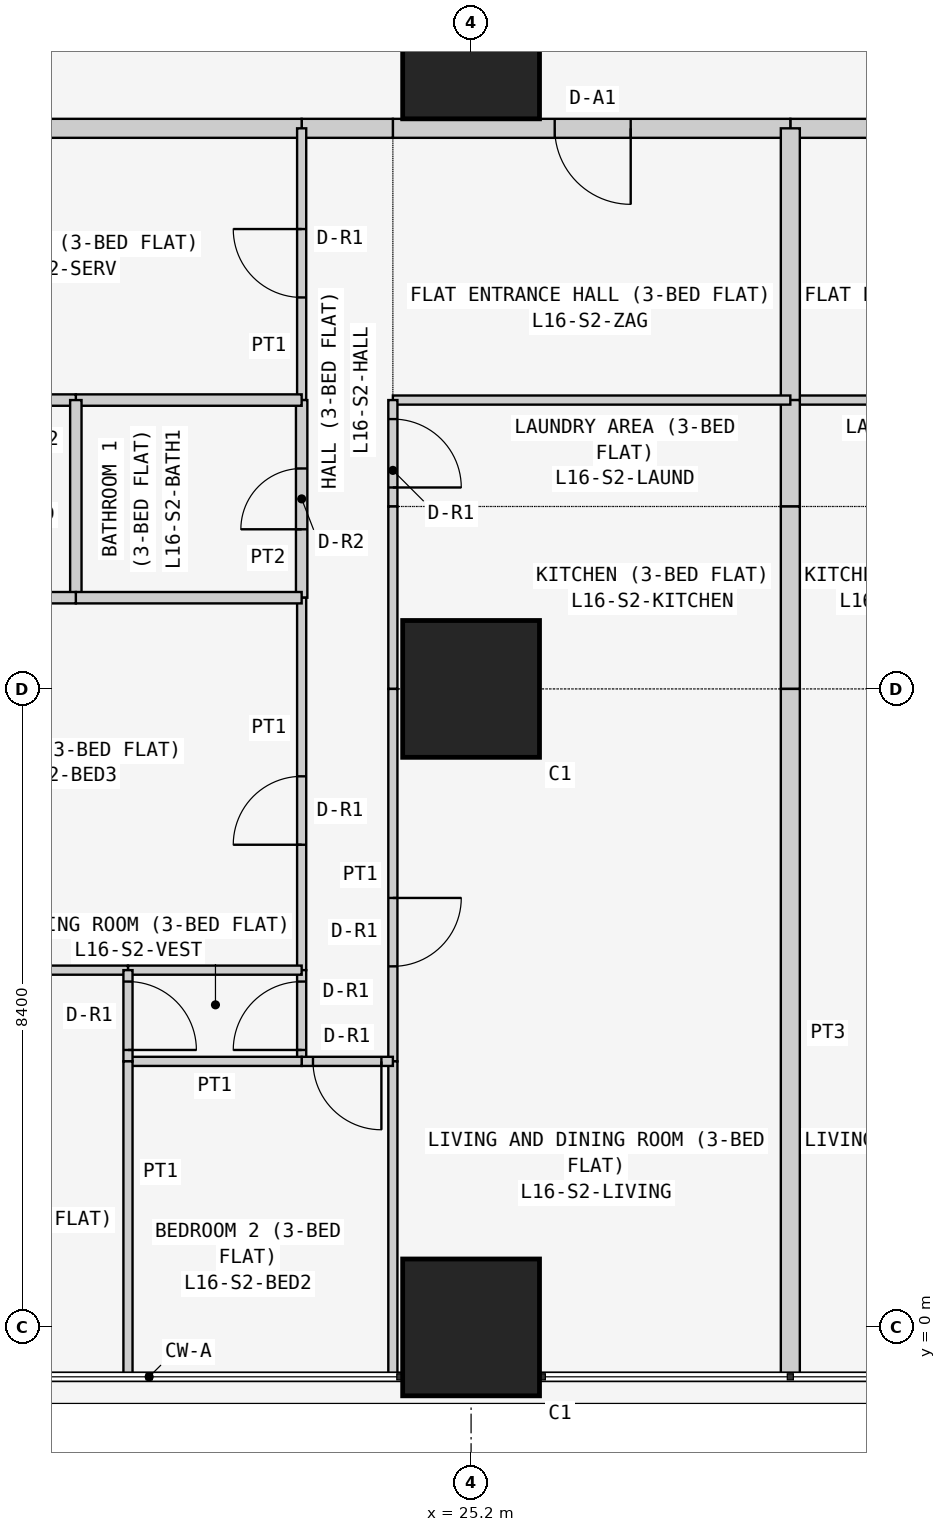
"""IFC4 building model, lengths in metres.
Left out: names, types, materials, properties, quantities, classifications, styles, units other than length and angle.
Written with IfcOpenShell. Run it as: python <this file> out.ifc"""

import sys

from ifc_helpers import new_model, si_unit, direction, frame, frame_2d, origin, origin_2d, place, context, subcontext, project, spatial, rectangle, extrude, element, fill, save


model = new_model("IFC4")
c1 = context("Model", 3, precision=1e-05, world=origin(), true_north=direction((0.0, 1.0)))
c2 = subcontext(c1, "Body", "Model", "MODEL_VIEW")
j1 = project(units=[si_unit("LENGTHUNIT", "METRE"), si_unit("PLANEANGLEUNIT", "RADIAN")], contexts=[c1])
p1 = place(None, origin())
s1 = spatial("IfcSite", under=j1, at=p1, CompositionType="ELEMENT")
p2 = place(p1, origin())
s2 = spatial("IfcBuilding", under=s1, at=p2, CompositionType="ELEMENT")
p3 = place(p2, frame((0.0, 0.0, 66.9)))
s3 = spatial("IfcBuildingStorey", under=s2, at=p3, CompositionType="ELEMENT", Elevation=66.9)
for number, where, z_axis, x_axis in (
    (1, (25.2, 0.0, 0.0), (0.0, 0.0, 1.0), (1.0, 0.0, 0.0)),
    (2, (25.2, 8.4, 0.0), (0.0, 0.0, 1.0), (1.0, 0.0, 0.0)),
    (3, (25.2, 16.8, 0.0), (0.0, 0.0, 1.0), (1.0, 0.0, 0.0)),
):
    element("IfcColumn", number, at=place(p3, frame(where, z_axis=z_axis, x_axis=x_axis)), inside=s3, PredefinedType="COLUMN", context=c2, shape_type="SweptSolid", body=[
        extrude(rectangle(XDim=1.8, YDim=1.8, at=origin_2d()), origin(), (0.0, 0.0, 1.0), 3.6),
    ])
p4 = place(p3, frame((34.629, 15.775, 0.0), z_axis=(0.0, 0.0, 1.0), x_axis=(-1.0, 0.0, 0.0)))
e4 = element("IfcWall", 4, at=p4, inside=s3, PredefinedType="PARTITIONING", context=c2, shape_type="SweptSolid", body=[
    extrude(rectangle(XDim=5.229, YDim=0.25, at=frame_2d((2.615, 0.0))), origin(), (0.0, 0.0, 1.0), 3.45),
])
p5 = place(p4, frame((2.129, 0.0, 0.0)))
e5 = element("IfcOpeningElement", 5, at=p5, cuts=e4, PredefinedType="OPENING", context=c2, shape_type="SweptSolid", body=[
    extrude(rectangle(XDim=1.0, YDim=2.1, at=frame_2d((0.5, 1.05))), frame((0.0, 0.135, 0.0), z_axis=(0.0, -1.0, 0.0), x_axis=(1.0, 0.0, 0.0)), (0.0, 0.0, 1.0), 0.27),
])
p6 = place(p3, frame((29.4, 15.775, 0.0), z_axis=(0.0, 0.0, 1.0), x_axis=(-1.0, 0.0, 0.0)))
e6 = element("IfcWall", 6, at=p6, inside=s3, PredefinedType="PARTITIONING", context=c2, shape_type="SweptSolid", body=[
    extrude(rectangle(XDim=5.229, YDim=0.25, at=frame_2d((2.615, 0.0))), origin(), (0.0, 0.0, 1.0), 3.45),
])
p7 = place(p6, frame((2.1, 0.0, 0.0)))
e7 = element("IfcOpeningElement", 7, at=p7, cuts=e6, PredefinedType="OPENING", context=c2, shape_type="SweptSolid", body=[
    extrude(rectangle(XDim=1.0, YDim=2.1, at=frame_2d((0.5, 1.05))), frame((0.0, 0.135, 0.0), z_axis=(0.0, -1.0, 0.0), x_axis=(1.0, 0.0, 0.0)), (0.0, 0.0, 1.0), 0.27),
])
p8 = place(p3, frame((24.171, 15.775, 0.0), z_axis=(0.0, 0.0, 1.0), x_axis=(-1.0, 0.0, 0.0)))
e8 = element("IfcWall", 8, at=p8, inside=s3, PredefinedType="PARTITIONING", context=c2, shape_type="SweptSolid", body=[
    extrude(rectangle(XDim=1.2, YDim=0.25, at=frame_2d((0.6, 0.0))), origin(), (0.0, 0.0, 1.0), 3.45),
])
p9 = place(p3, frame((22.971, 15.775, 0.0), z_axis=(0.0, 0.0, 1.0), x_axis=(-1.0, 0.0, 0.0)))
e9 = element("IfcWall", 9, at=p9, inside=s3, PredefinedType="PARTITIONING", context=c2, shape_type="SweptSolid", body=[
    extrude(rectangle(XDim=6.871, YDim=0.25, at=frame_2d((3.436, 0.0))), origin(), (0.0, 0.0, 1.0), 3.45),
])
p10 = place(p3, frame((29.4, 12.2, 0.0), z_axis=(0.0, 0.0, 1.0), x_axis=(1.0, 0.0, 0.0)))
e10 = element("IfcWall", 10, at=p10, inside=s3, PredefinedType="PARTITIONING", context=c2, shape_type="SweptSolid", body=[
    extrude(rectangle(XDim=5.229, YDim=0.12, at=frame_2d((2.615, 0.0))), origin(), (0.0, 0.0, 1.0), 3.45),
])
p11 = place(p3, frame((29.4, 15.775, 0.0), z_axis=(0.0, 0.0, 1.0), x_axis=(0.0, -1.0, 0.0)))
e11 = element("IfcWall", 11, at=p11, inside=s3, PredefinedType="PARTITIONING", context=c2, shape_type="SweptSolid", body=[
    extrude(rectangle(XDim=3.575, YDim=0.25, at=frame_2d((1.788, 0.0))), origin(), (0.0, 0.0, 1.0), 2.848),
])
p12 = place(p3, frame((29.4, 12.2, 0.0), z_axis=(0.0, 0.0, 1.0), x_axis=(0.0, -1.0, 0.0)))
e12 = element("IfcWall", 12, at=p12, inside=s3, PredefinedType="PARTITIONING", context=c2, shape_type="SweptSolid", body=[
    extrude(rectangle(XDim=1.4, YDim=0.25, at=frame_2d((0.7, 0.0))), origin(), (0.0, 0.0, 1.0), 2.848),
])
p13 = place(p3, frame((29.4, 10.8, 0.0), z_axis=(0.0, 0.0, 1.0), x_axis=(0.0, -1.0, 0.0)))
e13 = element("IfcWall", 13, at=p13, inside=s3, PredefinedType="PARTITIONING", context=c2, shape_type="SweptSolid", body=[
    extrude(rectangle(XDim=2.4, YDim=0.25, at=frame_2d((1.2, 0.0))), origin(), (0.0, 0.0, 1.0), 2.848),
])
p14 = place(p3, frame((29.4, 8.4, 0.0), z_axis=(0.0, 0.0, 1.0), x_axis=(0.0, -1.0, 0.0)))
e14 = element("IfcWall", 14, at=p14, inside=s3, PredefinedType="PARTITIONING", context=c2, shape_type="SweptSolid", body=[
    extrude(rectangle(XDim=9.05, YDim=0.25, at=frame_2d((4.525, 0.0))), origin(), (0.0, 0.0, 1.0), 2.848),
])
p15 = place(p3, frame((29.4, 12.2, 0.0), z_axis=(0.0, 0.0, 1.0), x_axis=(-1.0, 0.0, 0.0)))
e15 = element("IfcWall", 15, at=p15, inside=s3, PredefinedType="PARTITIONING", context=c2, shape_type="SweptSolid", body=[
    extrude(rectangle(XDim=5.229, YDim=0.12, at=frame_2d((2.615, 0.0))), origin(), (0.0, 0.0, 1.0), 3.45),
])
p16 = place(p3, frame((24.171, 10.8, 0.0), z_axis=(0.0, 0.0, 1.0), x_axis=(0.0, 1.0, 0.0)))
e16 = element("IfcWall", 16, at=p16, inside=s3, PredefinedType="PARTITIONING", context=c2, shape_type="SweptSolid", body=[
    extrude(rectangle(XDim=1.4, YDim=0.12, at=frame_2d((0.7, 0.0))), origin(), (0.0, 0.0, 1.0), 3.45),
])
p17 = place(p16, frame((0.25, 0.0, 0.0)))
e17 = element("IfcOpeningElement", 17, at=p17, cuts=e16, PredefinedType="OPENING", context=c2, shape_type="SweptSolid", body=[
    extrude(rectangle(XDim=0.9, YDim=2.1, at=frame_2d((0.45, 1.05))), frame((0.0, 0.07, 0.0), z_axis=(0.0, -1.0, 0.0), x_axis=(1.0, 0.0, 0.0)), (0.0, 0.0, 1.0), 0.14),
])
p18 = place(p3, frame((24.171, 8.4, 0.0), z_axis=(0.0, 0.0, 1.0), x_axis=(0.0, 1.0, 0.0)))
e18 = element("IfcWall", 18, at=p18, inside=s3, PredefinedType="PARTITIONING", context=c2, shape_type="SweptSolid", body=[
    extrude(rectangle(XDim=2.4, YDim=0.12, at=frame_2d((1.2, 0.0))), origin(), (0.0, 0.0, 1.0), 3.45),
])
p19 = place(p3, frame((24.171, 3.5, 0.0), z_axis=(0.0, 0.0, 1.0), x_axis=(0.0, 1.0, 0.0)))
e19 = element("IfcWall", 19, at=p19, inside=s3, PredefinedType="PARTITIONING", context=c2, shape_type="SweptSolid", body=[
    extrude(rectangle(XDim=4.9, YDim=0.12, at=frame_2d((2.45, 0.0))), origin(), (0.0, 0.0, 1.0), 3.45),
])
p20 = place(p19, frame((1.25, 0.0, 0.0)))
e20 = element("IfcOpeningElement", 20, at=p20, cuts=e19, PredefinedType="OPENING", context=c2, shape_type="SweptSolid", body=[
    extrude(rectangle(XDim=0.9, YDim=2.1, at=frame_2d((0.45, 1.05))), frame((0.0, 0.07, 0.0), z_axis=(0.0, -1.0, 0.0), x_axis=(1.0, 0.0, 0.0)), (0.0, 0.0, 1.0), 0.14),
])
p21 = place(p3, frame((24.171, -0.65, 0.0), z_axis=(0.0, 0.0, 1.0), x_axis=(0.0, 1.0, 0.0)))
e21 = element("IfcWall", 21, at=p21, inside=s3, PredefinedType="PARTITIONING", context=c2, shape_type="SweptSolid", body=[
    extrude(rectangle(XDim=4.15, YDim=0.12, at=frame_2d((2.075, 0.0))), origin(), (0.0, 0.0, 1.0), 3.45),
])
p22 = place(p3, frame((22.971, 12.2, 0.0), z_axis=(0.0, 0.0, 1.0), x_axis=(0.0, 1.0, 0.0)))
e22 = element("IfcWall", 22, at=p22, inside=s3, PredefinedType="PARTITIONING", context=c2, shape_type="SweptSolid", body=[
    extrude(rectangle(XDim=3.575, YDim=0.12, at=frame_2d((1.788, 0.0))), origin(), (0.0, 0.0, 1.0), 3.45),
])
p23 = place(p22, frame((1.35, 0.0, 0.0)))
e23 = element("IfcOpeningElement", 23, at=p23, cuts=e22, PredefinedType="OPENING", context=c2, shape_type="SweptSolid", body=[
    extrude(rectangle(XDim=0.9, YDim=2.1, at=frame_2d((0.45, 1.05))), frame((0.0, 0.07, 0.0), z_axis=(0.0, -1.0, 0.0), x_axis=(1.0, 0.0, 0.0)), (0.0, 0.0, 1.0), 0.14),
])
p24 = place(p3, frame((22.971, 9.6, 0.0), z_axis=(0.0, 0.0, 1.0), x_axis=(0.0, 1.0, 0.0)))
e24 = element("IfcWall", 24, at=p24, inside=s3, PredefinedType="PARTITIONING", context=c2, shape_type="SweptSolid", body=[
    extrude(rectangle(XDim=2.6, YDim=0.15, at=frame_2d((1.3, 0.0))), origin(), (0.0, 0.0, 1.0), 3.45),
])
p25 = place(p24, frame((0.9, 0.0, 0.0)))
e25 = element("IfcOpeningElement", 25, at=p25, cuts=e24, PredefinedType="OPENING", context=c2, shape_type="SweptSolid", body=[
    extrude(rectangle(XDim=0.8, YDim=2.1, at=frame_2d((0.4, 1.05))), frame((0.0, 0.085, 0.0), z_axis=(0.0, -1.0, 0.0), x_axis=(1.0, 0.0, 0.0)), (0.0, 0.0, 1.0), 0.17),
])
p26 = place(p3, frame((22.971, 4.7, 0.0), z_axis=(0.0, 0.0, 1.0), x_axis=(0.0, 1.0, 0.0)))
e26 = element("IfcWall", 26, at=p26, inside=s3, PredefinedType="PARTITIONING", context=c2, shape_type="SweptSolid", body=[
    extrude(rectangle(XDim=4.9, YDim=0.12, at=frame_2d((2.45, 0.0))), origin(), (0.0, 0.0, 1.0), 3.45),
])
p27 = place(p26, frame((1.65, 0.0, 0.0)))
e27 = element("IfcOpeningElement", 27, at=p27, cuts=e26, PredefinedType="OPENING", context=c2, shape_type="SweptSolid", body=[
    extrude(rectangle(XDim=0.9, YDim=2.1, at=frame_2d((0.45, 1.05))), frame((0.0, 0.07, 0.0), z_axis=(0.0, -1.0, 0.0), x_axis=(1.0, 0.0, 0.0)), (0.0, 0.0, 1.0), 0.14),
])
p28 = place(p3, frame((22.971, 3.5, 0.0), z_axis=(0.0, 0.0, 1.0), x_axis=(0.0, 1.0, 0.0)))
e28 = element("IfcWall", 28, at=p28, inside=s3, PredefinedType="PARTITIONING", context=c2, shape_type="SweptSolid", body=[
    extrude(rectangle(XDim=1.2, YDim=0.12, at=frame_2d((0.6, 0.0))), origin(), (0.0, 0.0, 1.0), 3.45),
])
p29 = place(p28, frame((0.15, 0.0, 0.0)))
e29 = element("IfcOpeningElement", 29, at=p29, cuts=e28, PredefinedType="OPENING", context=c2, shape_type="SweptSolid", body=[
    extrude(rectangle(XDim=0.9, YDim=2.1, at=frame_2d((0.45, 1.05))), frame((0.0, 0.07, 0.0), z_axis=(0.0, -1.0, 0.0), x_axis=(1.0, 0.0, 0.0)), (0.0, 0.0, 1.0), 0.14),
])
p30 = place(p3, frame((24.171, 3.5, 0.0), z_axis=(0.0, 0.0, 1.0), x_axis=(-1.0, 0.0, 0.0)))
e30 = element("IfcWall", 30, at=p30, inside=s3, PredefinedType="PARTITIONING", context=c2, shape_type="SweptSolid", body=[
    extrude(rectangle(XDim=1.2, YDim=0.12, at=frame_2d((0.6, 0.0))), origin(), (0.0, 0.0, 1.0), 3.45),
])
p31 = place(p30, frame((0.151, 0.0, 0.0)))
e31 = element("IfcOpeningElement", 31, at=p31, cuts=e30, PredefinedType="OPENING", context=c2, shape_type="SweptSolid", body=[
    extrude(rectangle(XDim=0.9, YDim=2.1, at=frame_2d((0.45, 1.05))), frame((0.0, 0.07, 0.0), z_axis=(0.0, -1.0, 0.0), x_axis=(1.0, 0.0, 0.0)), (0.0, 0.0, 1.0), 0.14),
])
p32 = place(p3, frame((22.971, 12.2, 0.0), z_axis=(0.0, 0.0, 1.0), x_axis=(-1.0, 0.0, 0.0)))
e32 = element("IfcWall", 32, at=p32, inside=s3, PredefinedType="PARTITIONING", context=c2, shape_type="SweptSolid", body=[
    extrude(rectangle(XDim=2.971, YDim=0.15, at=frame_2d((1.485, 0.0))), origin(), (0.0, 0.0, 1.0), 3.45),
])
p33 = place(p3, frame((20.0, 12.2, 0.0), z_axis=(0.0, 0.0, 1.0), x_axis=(-1.0, 0.0, 0.0)))
e33 = element("IfcWall", 33, at=p33, inside=s3, PredefinedType="PARTITIONING", context=c2, shape_type="SweptSolid", body=[
    extrude(rectangle(XDim=3.9, YDim=0.15, at=frame_2d((1.95, 0.0))), origin(), (0.0, 0.0, 1.0), 3.45),
])
p34 = place(p33, frame((1.45, 0.0, 0.0)))
e34 = element("IfcOpeningElement", 34, at=p34, cuts=e33, PredefinedType="OPENING", context=c2, shape_type="SweptSolid", body=[
    extrude(rectangle(XDim=0.8, YDim=2.1, at=frame_2d((0.4, 1.05))), frame((0.0, 0.085, 0.0), z_axis=(0.0, -1.0, 0.0), x_axis=(1.0, 0.0, 0.0)), (0.0, 0.0, 1.0), 0.17),
])
p35 = place(p3, frame((20.0, 9.6, 0.0), z_axis=(0.0, 0.0, 1.0), x_axis=(0.0, 1.0, 0.0)))
e35 = element("IfcWall", 35, at=p35, inside=s3, PredefinedType="PARTITIONING", context=c2, shape_type="SweptSolid", body=[
    extrude(rectangle(XDim=2.6, YDim=0.15, at=frame_2d((1.3, 0.0))), origin(), (0.0, 0.0, 1.0), 3.45),
])
p36 = place(p3, frame((22.971, 9.6, 0.0), z_axis=(0.0, 0.0, 1.0), x_axis=(-1.0, 0.0, 0.0)))
e36 = element("IfcWall", 36, at=p36, inside=s3, PredefinedType="PARTITIONING", context=c2, shape_type="SweptSolid", body=[
    extrude(rectangle(XDim=2.971, YDim=0.15, at=frame_2d((1.485, 0.0))), origin(), (0.0, 0.0, 1.0), 3.45),
])
p37 = place(p3, frame((20.0, 9.6, 0.0), z_axis=(0.0, 0.0, 1.0), x_axis=(-1.0, 0.0, 0.0)))
e37 = element("IfcWall", 37, at=p37, inside=s3, PredefinedType="PARTITIONING", context=c2, shape_type="SweptSolid", body=[
    extrude(rectangle(XDim=3.9, YDim=0.15, at=frame_2d((1.95, 0.0))), origin(), (0.0, 0.0, 1.0), 3.45),
])
p38 = place(p3, frame((22.971, 4.7, 0.0), z_axis=(0.0, 0.0, 1.0), x_axis=(-1.0, 0.0, 0.0)))
e38 = element("IfcWall", 38, at=p38, inside=s3, PredefinedType="PARTITIONING", context=c2, shape_type="SweptSolid", body=[
    extrude(rectangle(XDim=2.285, YDim=0.12, at=frame_2d((1.143, 0.0))), origin(), (0.0, 0.0, 1.0), 3.45),
])
p39 = place(p3, frame((20.686, 4.7, 0.0), z_axis=(0.0, 0.0, 1.0), x_axis=(-1.0, 0.0, 0.0)))
e39 = element("IfcWall", 39, at=p39, inside=s3, PredefinedType="PARTITIONING", context=c2, shape_type="SweptSolid", body=[
    extrude(rectangle(XDim=4.586, YDim=0.12, at=frame_2d((2.293, 0.0))), origin(), (0.0, 0.0, 1.0), 3.45),
])
p40 = place(p3, frame((22.971, 3.5, 0.0), z_axis=(0.0, 0.0, 1.0), x_axis=(-1.0, 0.0, 0.0)))
e40 = element("IfcWall", 40, at=p40, inside=s3, PredefinedType="PARTITIONING", context=c2, shape_type="SweptSolid", body=[
    extrude(rectangle(XDim=2.285, YDim=0.12, at=frame_2d((1.143, 0.0))), origin(), (0.0, 0.0, 1.0), 3.45),
])
p41 = place(p3, frame((20.686, 3.5, 0.0), z_axis=(0.0, 0.0, 1.0), x_axis=(0.0, 1.0, 0.0)))
e41 = element("IfcWall", 41, at=p41, inside=s3, PredefinedType="PARTITIONING", context=c2, shape_type="SweptSolid", body=[
    extrude(rectangle(XDim=1.2, YDim=0.12, at=frame_2d((0.6, 0.0))), origin(), (0.0, 0.0, 1.0), 3.45),
])
p42 = place(p41, frame((0.15, 0.0, 0.0)))
e42 = element("IfcOpeningElement", 42, at=p42, cuts=e41, PredefinedType="OPENING", context=c2, shape_type="SweptSolid", body=[
    extrude(rectangle(XDim=0.9, YDim=2.1, at=frame_2d((0.45, 1.05))), frame((0.0, 0.07, 0.0), z_axis=(0.0, -1.0, 0.0), x_axis=(1.0, 0.0, 0.0)), (0.0, 0.0, 1.0), 0.14),
])
p43 = place(p3, frame((20.686, -0.65, 0.0), z_axis=(0.0, 0.0, 1.0), x_axis=(0.0, 1.0, 0.0)))
e43 = element("IfcWall", 43, at=p43, inside=s3, PredefinedType="PARTITIONING", context=c2, shape_type="SweptSolid", body=[
    extrude(rectangle(XDim=4.15, YDim=0.12, at=frame_2d((2.075, 0.0))), origin(), (0.0, 0.0, 1.0), 3.45),
])
p44 = place(p7, origin())
e44 = element("IfcDoor", 44, at=p44, inside=s3, OperationType="SINGLE_SWING_LEFT", PredefinedType="DOOR", context=c2, shape_type="SweptSolid", body=[
    extrude(rectangle(XDim=1.0, YDim=2.1, at=frame_2d((0.5, 1.05))), frame((0.0, 0.025, 0.0), z_axis=(0.0, -1.0, 0.0), x_axis=(1.0, 0.0, 0.0)), (0.0, 0.0, 1.0), 0.05),
])
fill(e7, e44)
p45 = place(p17, frame((0.9, 0.0, 0.0), z_axis=(0.0, 0.0, 1.0), x_axis=(-1.0, 0.0, 0.0)))
e45 = element("IfcDoor", 45, at=p45, inside=s3, OperationType="SINGLE_SWING_RIGHT", PredefinedType="DOOR", context=c2, shape_type="SweptSolid", body=[
    extrude(rectangle(XDim=0.9, YDim=2.1, at=frame_2d((0.45, 1.05))), frame((0.0, 0.025, 0.0), z_axis=(0.0, -1.0, 0.0), x_axis=(1.0, 0.0, 0.0)), (0.0, 0.0, 1.0), 0.05),
])
fill(e17, e45)
p46 = place(p20, frame((0.9, 0.0, 0.0), z_axis=(0.0, 0.0, 1.0), x_axis=(-1.0, 0.0, 0.0)))
e46 = element("IfcDoor", 46, at=p46, inside=s3, OperationType="SINGLE_SWING_LEFT", PredefinedType="DOOR", context=c2, shape_type="SweptSolid", body=[
    extrude(rectangle(XDim=0.9, YDim=2.1, at=frame_2d((0.45, 1.05))), frame((0.0, 0.025, 0.0), z_axis=(0.0, -1.0, 0.0), x_axis=(1.0, 0.0, 0.0)), (0.0, 0.0, 1.0), 0.05),
])
fill(e20, e46)
p47 = place(p23, origin())
e47 = element("IfcDoor", 47, at=p47, inside=s3, OperationType="SINGLE_SWING_RIGHT", PredefinedType="DOOR", context=c2, shape_type="SweptSolid", body=[
    extrude(rectangle(XDim=0.9, YDim=2.1, at=frame_2d((0.45, 1.05))), frame((0.0, 0.025, 0.0), z_axis=(0.0, -1.0, 0.0), x_axis=(1.0, 0.0, 0.0)), (0.0, 0.0, 1.0), 0.05),
])
fill(e23, e47)
p48 = place(p25, origin())
e48 = element("IfcDoor", 48, at=p48, inside=s3, OperationType="SINGLE_SWING_LEFT", PredefinedType="DOOR", context=c2, shape_type="SweptSolid", body=[
    extrude(rectangle(XDim=0.8, YDim=2.1, at=frame_2d((0.4, 1.05))), frame((0.0, 0.025, 0.0), z_axis=(0.0, -1.0, 0.0), x_axis=(1.0, 0.0, 0.0)), (0.0, 0.0, 1.0), 0.05),
])
fill(e25, e48)
p49 = place(p27, origin())
e49 = element("IfcDoor", 49, at=p49, inside=s3, OperationType="SINGLE_SWING_LEFT", PredefinedType="DOOR", context=c2, shape_type="SweptSolid", body=[
    extrude(rectangle(XDim=0.9, YDim=2.1, at=frame_2d((0.45, 1.05))), frame((0.0, 0.025, 0.0), z_axis=(0.0, -1.0, 0.0), x_axis=(1.0, 0.0, 0.0)), (0.0, 0.0, 1.0), 0.05),
])
fill(e27, e49)
p50 = place(p29, origin())
e50 = element("IfcDoor", 50, at=p50, inside=s3, OperationType="SINGLE_SWING_LEFT", PredefinedType="DOOR", context=c2, shape_type="SweptSolid", body=[
    extrude(rectangle(XDim=0.9, YDim=2.1, at=frame_2d((0.45, 1.05))), frame((0.0, 0.025, 0.0), z_axis=(0.0, -1.0, 0.0), x_axis=(1.0, 0.0, 0.0)), (0.0, 0.0, 1.0), 0.05),
])
fill(e29, e50)
p51 = place(p42, frame((0.9, 0.0, 0.0), z_axis=(0.0, 0.0, 1.0), x_axis=(-1.0, 0.0, 0.0)))
e51 = element("IfcDoor", 51, at=p51, inside=s3, OperationType="SINGLE_SWING_RIGHT", PredefinedType="DOOR", context=c2, shape_type="SweptSolid", body=[
    extrude(rectangle(XDim=0.9, YDim=2.1, at=frame_2d((0.45, 1.05))), frame((0.0, 0.025, 0.0), z_axis=(0.0, -1.0, 0.0), x_axis=(1.0, 0.0, 0.0)), (0.0, 0.0, 1.0), 0.05),
])
fill(e42, e51)
p52 = place(p31, origin())
e52 = element("IfcDoor", 52, at=p52, inside=s3, OperationType="SINGLE_SWING_LEFT", PredefinedType="DOOR", context=c2, shape_type="SweptSolid", body=[
    extrude(rectangle(XDim=0.9, YDim=2.1, at=frame_2d((0.45, 1.05))), frame((0.0, 0.025, 0.0), z_axis=(0.0, -1.0, 0.0), x_axis=(1.0, 0.0, 0.0)), (0.0, 0.0, 1.0), 0.05),
])
fill(e31, e52)
save(model, sys.argv[1])
